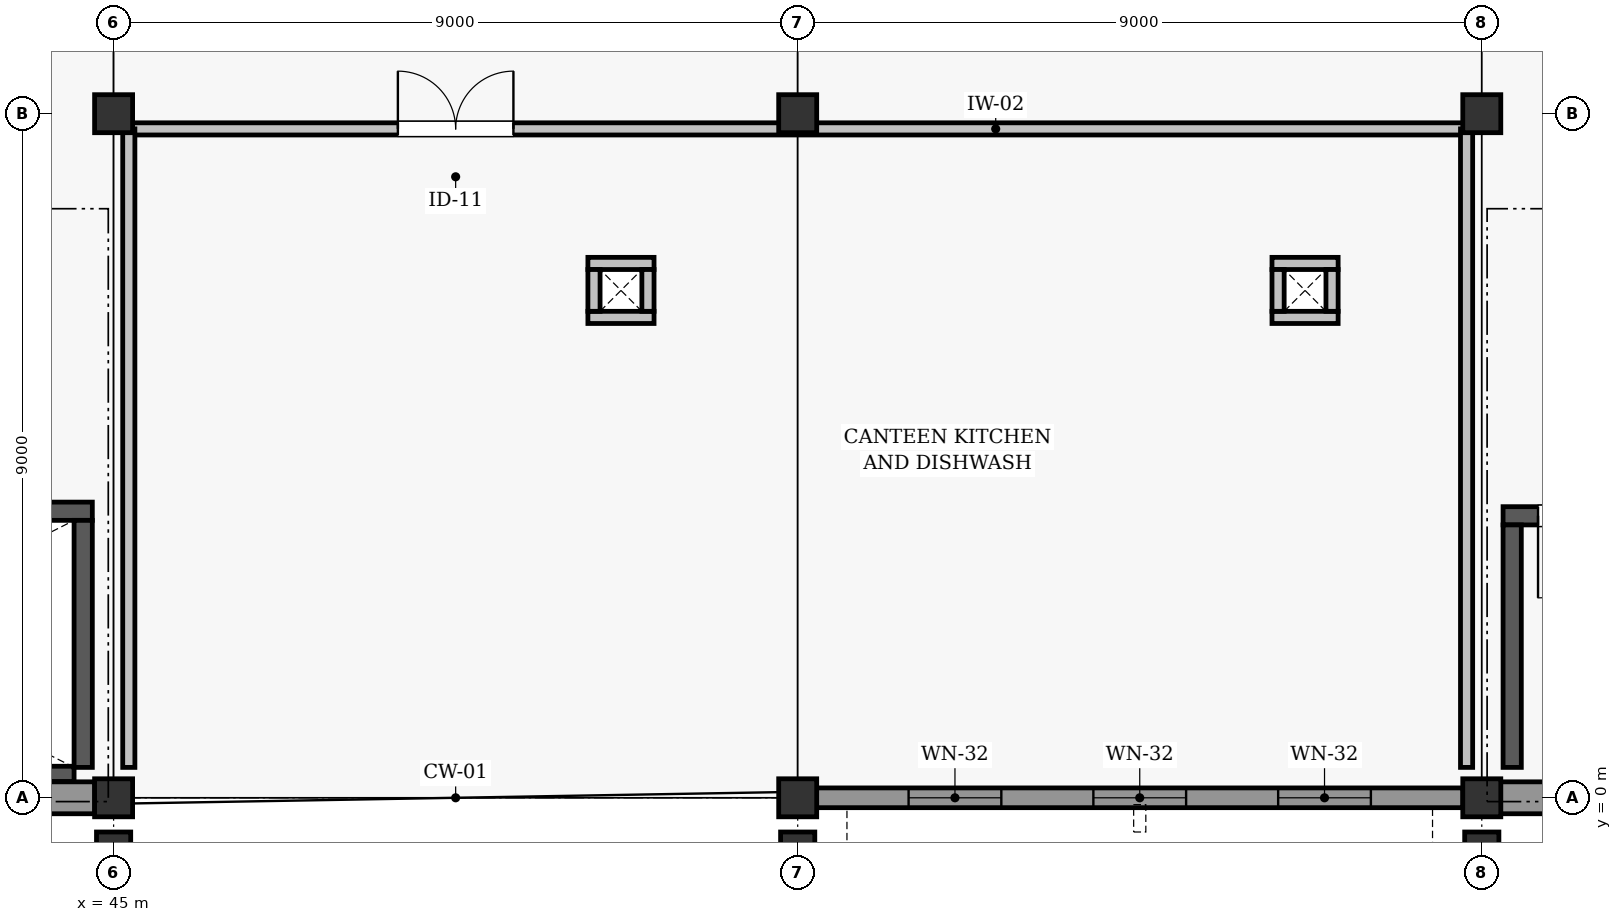
"""IFC4 building model, lengths in metres.
Left out: names, types, materials, properties, quantities, classifications, styles, units other than length and angle.
Written with IfcOpenShell. Run it as: python <this file> out.ifc"""

import sys

from ifc_helpers import new_model, si_unit, direction, frame, frame_2d, origin, origin_2d, place, context, subcontext, project, spatial, rectangle, extrude, element, fill, save


model = new_model("IFC4")
c1 = context("Model", 3, precision=1e-05, world=origin(), true_north=direction((0.0, 1.0)))
c2 = subcontext(c1, "Body", "Model", "MODEL_VIEW")
j1 = project(units=[si_unit("LENGTHUNIT", "METRE"), si_unit("PLANEANGLEUNIT", "RADIAN")], contexts=[c1])
p1 = place(None, origin())
s1 = spatial("IfcSite", under=j1, at=p1, CompositionType="ELEMENT")
p2 = place(p1, origin())
s2 = spatial("IfcBuilding", under=s1, at=p2, CompositionType="ELEMENT")
p3 = place(p2, frame((0.0, 0.0, 12.0)))
s3 = spatial("IfcBuildingStorey", under=s2, at=p3, CompositionType="ELEMENT", Elevation=12.0)
for number, where, z_axis, x_axis in (
    (1, (45.0, 0.0, 0.0), (0.0, 0.0, 1.0), (1.0, 0.0, 0.0)),
    (2, (45.0, 9.0, 0.0), (0.0, 0.0, 1.0), (1.0, 0.0, 0.0)),
    (3, (54.0, 0.0, 0.0), (0.0, 0.0, 1.0), (1.0, 0.0, 0.0)),
    (4, (54.0, 9.0, 0.0), (0.0, 0.0, 1.0), (1.0, 0.0, 0.0)),
    (5, (63.0, 0.0, 0.0), (0.0, 0.0, 1.0), (1.0, 0.0, 0.0)),
    (6, (63.0, 9.0, 0.0), (0.0, 0.0, 1.0), (1.0, 0.0, 0.0)),
):
    element("IfcColumn", number, at=place(p3, frame(where, z_axis=z_axis, x_axis=x_axis)), inside=s3, PredefinedType="COLUMN", context=c2, shape_type="SweptSolid", body=[
        extrude(rectangle(XDim=0.5, YDim=0.5, at=origin_2d()), origin(), (0.0, 0.0, 1.0), 3.0),
    ])
for number, where, z_axis, x_axis in (
    (7, (45.0, -0.75, 0.0), (0.0, 0.0, 1.0), (1.0, 0.0, 0.0)),
    (8, (54.0, -0.75, 0.0), (0.0, 0.0, 1.0), (1.0, 0.0, 0.0)),
):
    element("IfcColumn", number, at=place(p3, frame(where, z_axis=z_axis, x_axis=x_axis)), inside=s3, PredefinedType="PILASTER", context=c2, shape_type="SweptSolid", body=[
        extrude(rectangle(XDim=0.45, YDim=0.6, at=origin_2d()), origin(), (0.0, 0.0, 1.0), 3.0),
    ])
p4 = place(p3, frame((63.0, -0.75, 0.0), z_axis=(0.0, 0.0, 1.0), x_axis=(1.0, 0.0, 0.0)))
e9 = element("IfcColumn", 9, at=p4, inside=s3, PredefinedType="PILASTER", context=c2, shape_type="SweptSolid", body=[
    extrude(rectangle(XDim=0.45, YDim=0.6, at=origin_2d()), origin(), (0.0, 0.0, 1.0), 3.95),
])
p5 = place(p3, frame((36.248, 0.0, 0.0), z_axis=(0.0, 0.0, 1.0), x_axis=(1.0, 0.0, 0.0)))
e10 = element("IfcWall", 10, at=p5, inside=s3, PredefinedType="SOLIDWALL", context=c2, shape_type="SweptSolid", body=[
    extrude(rectangle(XDim=8.504, YDim=0.42, at=frame_2d((4.252, 0.0))), origin(), (0.0, 0.0, 1.0), 2.262),
])
p6 = place(p3, frame((54.248, 0.0, 0.0), z_axis=(0.0, 0.0, 1.0), x_axis=(1.0, 0.0, 0.0)))
e11 = element("IfcWall", 11, at=p6, inside=s3, PredefinedType="SOLIDWALL", context=c2, shape_type="SweptSolid", body=[
    extrude(rectangle(XDim=8.504, YDim=0.26, at=frame_2d((4.252, 0.0))), origin(), (0.0, 0.0, 1.0), 2.322),
])
p7 = place(p6, frame((1.211, 0.0, 0.8)))
e12 = element("IfcOpeningElement", 12, at=p7, cuts=e11, PredefinedType="OPENING", context=c2, shape_type="SweptSolid", body=[
    extrude(rectangle(XDim=1.22, YDim=1.12, at=frame_2d((0.61, 0.56))), frame((0.0, 0.14, 0.0), z_axis=(0.0, -1.0, 0.0), x_axis=(1.0, 0.0, 0.0)), (0.0, 0.0, 1.0), 0.28),
])
p8 = place(p6, frame((3.642, 0.0, 0.8)))
e13 = element("IfcOpeningElement", 13, at=p8, cuts=e11, PredefinedType="OPENING", context=c2, shape_type="SweptSolid", body=[
    extrude(rectangle(XDim=1.22, YDim=1.12, at=frame_2d((0.61, 0.56))), frame((0.0, 0.14, 0.0), z_axis=(0.0, -1.0, 0.0), x_axis=(1.0, 0.0, 0.0)), (0.0, 0.0, 1.0), 0.28),
])
p9 = place(p6, frame((6.073, 0.0, 0.8)))
e14 = element("IfcOpeningElement", 14, at=p9, cuts=e11, PredefinedType="OPENING", context=c2, shape_type="SweptSolid", body=[
    extrude(rectangle(XDim=1.22, YDim=1.12, at=frame_2d((0.61, 0.56))), frame((0.0, 0.14, 0.0), z_axis=(0.0, -1.0, 0.0), x_axis=(1.0, 0.0, 0.0)), (0.0, 0.0, 1.0), 0.28),
])
p10 = place(p3, frame((63.248, 0.0, 0.0), z_axis=(0.0, 0.0, 1.0), x_axis=(1.0, 0.0, 0.0)))
e15 = element("IfcWall", 15, at=p10, inside=s3, PredefinedType="SOLIDWALL", context=c2, shape_type="SweptSolid", body=[
    extrude(rectangle(XDim=8.504, YDim=0.42, at=frame_2d((4.252, 0.0))), origin(), (0.0, 0.0, 1.0), 2.322),
])
p11 = place(p3, frame((38.07, 0.315, 0.0), z_axis=(0.0, 0.0, 1.0), x_axis=(1.0, 0.0, 0.0)))
e16 = element("IfcWall", 16, at=p11, inside=s3, PredefinedType="SHEAR", context=c2, shape_type="SweptSolid", body=[
    extrude(rectangle(XDim=6.41, YDim=0.2, at=frame_2d((3.205, 0.0))), origin(), (0.0, 0.0, 1.0), 2.75),
])
p12 = place(p3, frame((36.28, 3.77, 0.0), z_axis=(0.0, 0.0, 1.0), x_axis=(1.0, 0.0, 0.0)))
e17 = element("IfcWall", 17, at=p12, inside=s3, PredefinedType="SHEAR", context=c2, shape_type="SweptSolid", body=[
    extrude(rectangle(XDim=8.44, YDim=0.24, at=frame_2d((4.22, 0.0))), origin(), (0.0, 0.0, 1.0), 2.75),
])
p13 = place(p12, frame((0.48, 0.0, 0.0)))
e18 = element("IfcOpeningElement", 18, at=p13, cuts=e17, PredefinedType="OPENING", context=c2, shape_type="SweptSolid", body=[
    extrude(rectangle(XDim=1.08, YDim=2.08, at=frame_2d((0.54, 1.04))), frame((0.0, 0.13, 0.0), z_axis=(0.0, -1.0, 0.0), x_axis=(1.0, 0.0, 0.0)), (0.0, 0.0, 1.0), 0.26),
])
p14 = place(p3, frame((44.6, 0.4, 0.0), z_axis=(0.0, 0.0, 1.0), x_axis=(0.0, 1.0, 0.0)))
e19 = element("IfcWall", 19, at=p14, inside=s3, PredefinedType="SHEAR", context=c2, shape_type="SweptSolid", body=[
    extrude(rectangle(XDim=3.25, YDim=0.24, at=frame_2d((1.625, 0.0))), origin(), (0.0, 0.0, 1.0), 2.75),
])
p15 = place(p3, frame((63.28, 3.71, 0.0), z_axis=(0.0, 0.0, 1.0), x_axis=(1.0, 0.0, 0.0)))
e20 = element("IfcWall", 20, at=p15, inside=s3, PredefinedType="SHEAR", context=c2, shape_type="SweptSolid", body=[
    extrude(rectangle(XDim=8.44, YDim=0.24, at=frame_2d((4.22, 0.0))), origin(), (0.0, 0.0, 1.0), 2.75),
])
p16 = place(p15, frame((0.46, 0.0, 0.0)))
e21 = element("IfcOpeningElement", 21, at=p16, cuts=e20, PredefinedType="OPENING", context=c2, shape_type="SweptSolid", body=[
    extrude(rectangle(XDim=1.08, YDim=2.08, at=frame_2d((0.54, 1.04))), frame((0.0, 0.13, 0.0), z_axis=(0.0, -1.0, 0.0), x_axis=(1.0, 0.0, 0.0)), (0.0, 0.0, 1.0), 0.26),
])
p17 = place(p3, frame((63.4, 0.4, 0.0), z_axis=(0.0, 0.0, 1.0), x_axis=(0.0, 1.0, 0.0)))
e22 = element("IfcWall", 22, at=p17, inside=s3, PredefinedType="SHEAR", context=c2, shape_type="SweptSolid", body=[
    extrude(rectangle(XDim=3.19, YDim=0.24, at=frame_2d((1.595, 0.0))), origin(), (0.0, 0.0, 1.0), 2.75),
])
for number, where, z_axis, x_axis in (
    (23, (51.24, 6.32, 0.0), (0.0, 0.0, 1.0), (1.0, 0.0, 0.0)),
    (24, (51.24, 7.03, 0.0), (0.0, 0.0, 1.0), (1.0, 0.0, 0.0)),
):
    element("IfcWall", number, at=place(p3, frame(where, z_axis=z_axis, x_axis=x_axis)), inside=s3, PredefinedType="PARTITIONING", context=c2, shape_type="SweptSolid", body=[
        extrude(rectangle(XDim=0.87, YDim=0.16, at=frame_2d((0.435, 0.0))), origin(), (0.0, 0.0, 1.0), 2.75),
    ])
for number, where, z_axis, x_axis in (
    (25, (51.32, 6.4, 0.0), (0.0, 0.0, 1.0), (0.0, 1.0, 0.0)),
    (26, (52.03, 6.4, 0.0), (0.0, 0.0, 1.0), (0.0, 1.0, 0.0)),
):
    element("IfcWall", number, at=place(p3, frame(where, z_axis=z_axis, x_axis=x_axis)), inside=s3, PredefinedType="PARTITIONING", context=c2, shape_type="SweptSolid", body=[
        extrude(rectangle(XDim=0.55, YDim=0.16, at=frame_2d((0.275, 0.0))), origin(), (0.0, 0.0, 1.0), 2.75),
    ])
for number, where, z_axis, x_axis in (
    (27, (60.24, 6.32, 0.0), (0.0, 0.0, 1.0), (1.0, 0.0, 0.0)),
    (28, (60.24, 7.03, 0.0), (0.0, 0.0, 1.0), (1.0, 0.0, 0.0)),
):
    element("IfcWall", number, at=place(p3, frame(where, z_axis=z_axis, x_axis=x_axis)), inside=s3, PredefinedType="PARTITIONING", context=c2, shape_type="SweptSolid", body=[
        extrude(rectangle(XDim=0.87, YDim=0.16, at=frame_2d((0.435, 0.0))), origin(), (0.0, 0.0, 1.0), 2.75),
    ])
for number, where, z_axis, x_axis in (
    (29, (60.32, 6.4, 0.0), (0.0, 0.0, 1.0), (0.0, 1.0, 0.0)),
    (30, (61.03, 6.4, 0.0), (0.0, 0.0, 1.0), (0.0, 1.0, 0.0)),
):
    element("IfcWall", number, at=place(p3, frame(where, z_axis=z_axis, x_axis=x_axis)), inside=s3, PredefinedType="PARTITIONING", context=c2, shape_type="SweptSolid", body=[
        extrude(rectangle(XDim=0.55, YDim=0.16, at=frame_2d((0.275, 0.0))), origin(), (0.0, 0.0, 1.0), 2.75),
    ])
p18 = place(p3, frame((45.2, 8.8, 0.0), z_axis=(0.0, 0.0, 1.0), x_axis=(1.0, 0.0, 0.0)))
e31 = element("IfcWall", 31, at=p18, inside=s3, PredefinedType="PARTITIONING", context=c2, shape_type="SweptSolid", body=[
    extrude(rectangle(XDim=17.6, YDim=0.16, at=frame_2d((8.8, 0.0))), origin(), (0.0, 0.0, 1.0), 2.295),
])
p19 = place(p18, frame((3.54, 0.0, 0.0)))
e32 = element("IfcOpeningElement", 32, at=p19, cuts=e31, PredefinedType="OPENING", context=c2, shape_type="SweptSolid", body=[
    extrude(rectangle(XDim=1.52, YDim=2.16, at=frame_2d((0.76, 1.08))), frame((0.0, 0.09, 0.0), z_axis=(0.0, -1.0, 0.0), x_axis=(1.0, 0.0, 0.0)), (0.0, 0.0, 1.0), 0.18),
])
p20 = place(p3, frame((45.2, 0.4, 0.0), z_axis=(0.0, 0.0, 1.0), x_axis=(0.0, 1.0, 0.0)))
e33 = element("IfcWall", 33, at=p20, inside=s3, PredefinedType="PARTITIONING", context=c2, shape_type="SweptSolid", body=[
    extrude(rectangle(XDim=8.4, YDim=0.16, at=frame_2d((4.2, 0.0))), origin(), (0.0, 0.0, 1.0), 2.295),
])
p21 = place(p3, frame((62.8, 0.4, 0.0), z_axis=(0.0, 0.0, 1.0), x_axis=(0.0, 1.0, 0.0)))
e34 = element("IfcWall", 34, at=p21, inside=s3, PredefinedType="PARTITIONING", context=c2, shape_type="SweptSolid", body=[
    extrude(rectangle(XDim=8.4, YDim=0.16, at=frame_2d((4.2, 0.0))), origin(), (0.0, 0.0, 1.0), 2.355),
])
p22 = place(p7, origin())
e35 = element("IfcWindow", 35, at=p22, inside=s3, PartitioningType="SINGLE_PANEL", PredefinedType="WINDOW", context=c2, shape_type="SweptSolid", body=[
    extrude(rectangle(XDim=1.22, YDim=1.12, at=frame_2d((0.61, 0.56))), frame((0.0, 0.03, 0.0), z_axis=(0.0, -1.0, 0.0), x_axis=(1.0, 0.0, 0.0)), (0.0, 0.0, 1.0), 0.06),
])
fill(e12, e35)
p23 = place(p8, origin())
e36 = element("IfcWindow", 36, at=p23, inside=s3, PartitioningType="SINGLE_PANEL", PredefinedType="WINDOW", context=c2, shape_type="SweptSolid", body=[
    extrude(rectangle(XDim=1.22, YDim=1.12, at=frame_2d((0.61, 0.56))), frame((0.0, 0.03, 0.0), z_axis=(0.0, -1.0, 0.0), x_axis=(1.0, 0.0, 0.0)), (0.0, 0.0, 1.0), 0.06),
])
fill(e13, e36)
p24 = place(p9, origin())
e37 = element("IfcWindow", 37, at=p24, inside=s3, PartitioningType="SINGLE_PANEL", PredefinedType="WINDOW", context=c2, shape_type="SweptSolid", body=[
    extrude(rectangle(XDim=1.22, YDim=1.12, at=frame_2d((0.61, 0.56))), frame((0.0, 0.03, 0.0), z_axis=(0.0, -1.0, 0.0), x_axis=(1.0, 0.0, 0.0)), (0.0, 0.0, 1.0), 0.06),
])
fill(e14, e37)
p25 = place(p16, frame((1.08, 0.0, 0.0), z_axis=(0.0, 0.0, 1.0), x_axis=(-1.0, 0.0, 0.0)))
e38 = element("IfcDoor", 38, at=p25, inside=s3, OperationType="SINGLE_SWING_LEFT", PredefinedType="DOOR", context=c2, shape_type="SweptSolid", body=[
    extrude(rectangle(XDim=1.08, YDim=2.08, at=frame_2d((0.54, 1.04))), frame((0.0, 0.025, 0.0), z_axis=(0.0, -1.0, 0.0), x_axis=(1.0, 0.0, 0.0)), (0.0, 0.0, 1.0), 0.05),
])
fill(e21, e38)
p26 = place(p19, origin())
e39 = element("IfcDoor", 39, at=p26, inside=s3, OperationType="DOUBLE_SWING_LEFT", PredefinedType="DOOR", context=c2, shape_type="SweptSolid", body=[
    extrude(rectangle(XDim=1.52, YDim=2.16, at=frame_2d((0.76, 1.08))), frame((0.0, 0.025, 0.0), z_axis=(0.0, -1.0, 0.0), x_axis=(1.0, 0.0, 0.0)), (0.0, 0.0, 1.0), 0.05),
])
fill(e32, e39)
save(model, sys.argv[1])
